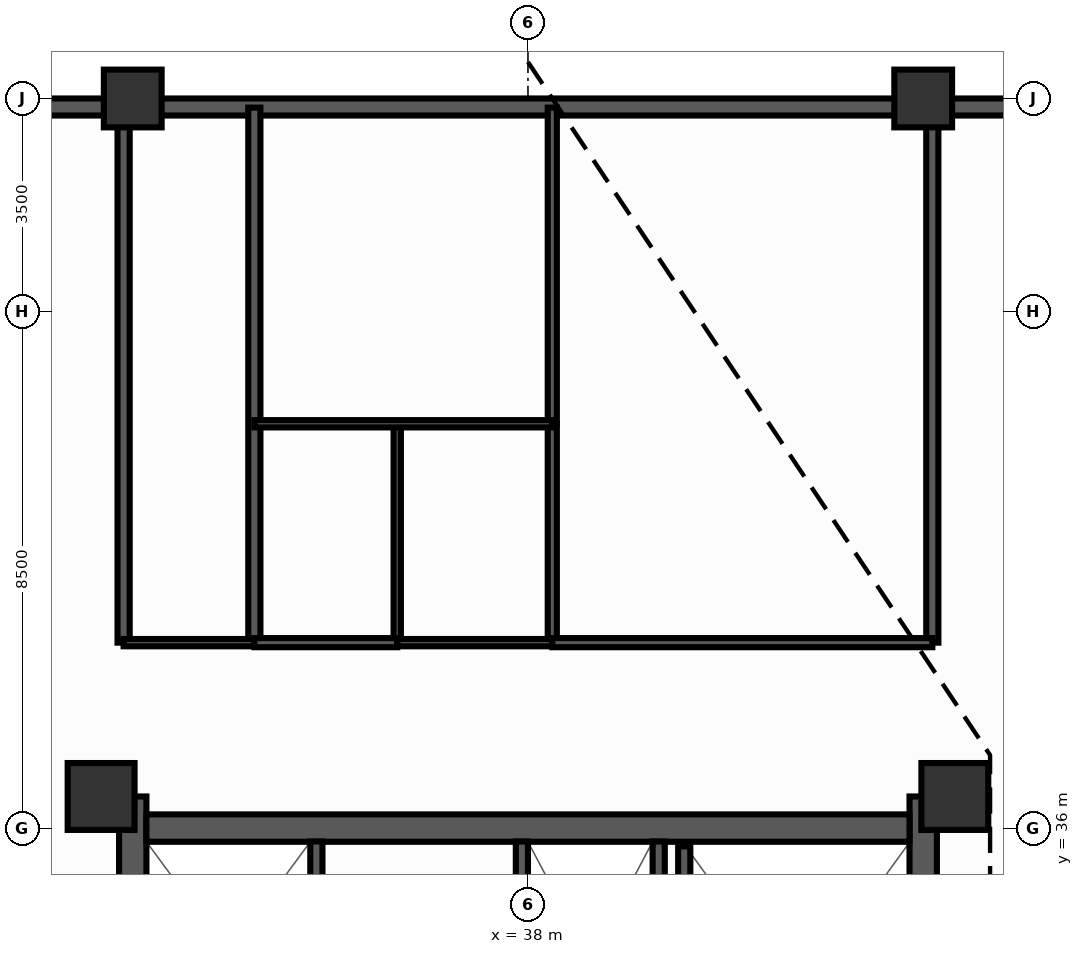
"""IFC4 building model, lengths in metres.
Left out: names, types, materials, properties, quantities, classifications, styles, units other than length and angle.
Written with IfcOpenShell. Run it as: python <this file> out.ifc"""

import sys

from ifc_helpers import new_model, si_unit, direction, frame, frame_2d, origin, origin_2d, place, context, subcontext, project, spatial, rectangle, extrude, source, transform, mapped, element, fill, save


model = new_model("IFC4")
c1 = context("Model", 3, precision=1e-05, world=origin(), true_north=direction((0.0, 1.0)))
c2 = subcontext(c1, "Body", "Model", "MODEL_VIEW")
j1 = project(units=[si_unit("LENGTHUNIT", "METRE"), si_unit("PLANEANGLEUNIT", "RADIAN")], contexts=[c1])
p1 = place(None, origin())
s1 = spatial("IfcSite", under=j1, at=p1, CompositionType="ELEMENT")
p2 = place(p1, origin())
s2 = spatial("IfcBuilding", under=s1, at=p2, CompositionType="ELEMENT")
p3 = place(p2, frame((0.0, 0.0, 148.7)))
s3 = spatial("IfcBuildingStorey", under=s2, at=p3, CompositionType="ELEMENT", Elevation=148.7)
p4 = place(p3, frame((31.5, 17.48, 0.0), z_axis=(0.0, 0.0, 1.0), x_axis=(0.0, 1.0, 0.0)))
e1 = element("IfcWall", 1, at=p4, inside=s3, PredefinedType="SHEAR", context=c2, shape_type="SweptSolid", body=[
    extrude(rectangle(XDim=19.04, YDim=0.45, at=frame_2d((9.52, 0.0))), origin(), (0.0, 0.0, 1.0), 3.5),
])
p5 = place(p4, frame((6.32, 0.0, 0.0)))
e2 = element("IfcOpeningElement", 2, at=p5, cuts=e1, PredefinedType="OPENING", context=c2, shape_type="SweptSolid", body=[
    extrude(rectangle(XDim=1.1, YDim=2.15, at=frame_2d((0.55, 1.075))), frame((0.0, 0.237, 0.0), z_axis=(0.0, -1.0, 0.0), x_axis=(1.0, 0.0, 0.0)), (0.0, 0.0, 1.0), 0.474),
])
p6 = place(p3, frame((44.5, 17.48, 0.0), z_axis=(0.0, 0.0, 1.0), x_axis=(0.0, 1.0, 0.0)))
e3 = element("IfcWall", 3, at=p6, inside=s3, PredefinedType="SHEAR", context=c2, shape_type="SweptSolid", body=[
    extrude(rectangle(XDim=19.04, YDim=0.45, at=frame_2d((9.52, 0.0))), origin(), (0.0, 0.0, 1.0), 3.5),
])
p7 = place(p6, frame((12.67, 0.0, 0.0), z_axis=(0.0, 0.0, 1.0), x_axis=(-1.0, 0.0, 0.0)))
e4 = element("IfcOpeningElement", 4, at=p7, cuts=e3, PredefinedType="OPENING", context=c2, shape_type="SweptSolid", body=[
    extrude(rectangle(XDim=1.1, YDim=2.15, at=frame_2d((0.55, 1.075))), frame((0.0, 0.237, 0.0), z_axis=(0.0, -1.0, 0.0), x_axis=(1.0, 0.0, 0.0)), (0.0, 0.0, 1.0), 0.474),
])
p8 = place(p3, frame((31.725, 36.0, 0.0), z_axis=(0.0, 0.0, 1.0), x_axis=(1.0, 0.0, 0.0)))
e5 = element("IfcWall", 5, at=p8, inside=s3, PredefinedType="SHEAR", context=c2, shape_type="SweptSolid", body=[
    extrude(rectangle(XDim=12.55, YDim=0.45, at=frame_2d((6.275, 0.0))), origin(), (0.0, 0.0, 1.0), 3.5),
])
p9 = place(p8, frame((5.225, 0.0, 0.0), z_axis=(0.0, 0.0, 1.0), x_axis=(-1.0, 0.0, 0.0)))
e6 = element("IfcOpeningElement", 6, at=p9, cuts=e5, PredefinedType="OPENING", context=c2, shape_type="SweptSolid", body=[
    extrude(rectangle(XDim=1.4, YDim=2.15, at=frame_2d((0.7, 1.075))), frame((0.0, 0.237, 0.0), z_axis=(0.0, -1.0, 0.0), x_axis=(1.0, 0.0, 0.0)), (0.0, 0.0, 1.0), 0.474),
])
m1 = source(origin(), c2, "Body", "SweptSolid", [
    extrude(rectangle(XDim=1.1, YDim=1.1, at=origin_2d()), origin(), (0.0, 0.0, 1.0), 3.5),
])
for number, where, z_axis, x_axis in (
    (7, (30.98, 36.52, 0.0), (0.0, 0.0, 1.0), (1.0, 0.0, 0.0)),
    (8, (45.02, 36.52, 0.0), (0.0, 0.0, 1.0), (1.0, 0.0, 0.0)),
):
    element("IfcColumn", number, at=place(p3, frame(where, z_axis=z_axis, x_axis=x_axis)), inside=s3, PredefinedType="COLUMN", context=c2, shape_type="MappedRepresentation", body=[
        mapped(m1, transform((0.0, 0.0, 0.0), scale=1.0)),
    ])
m2 = source(origin(), c2, "Body", "SweptSolid", [
    extrude(rectangle(XDim=0.95, YDim=0.95, at=origin_2d()), origin(), (0.0, 0.0, 1.0), 3.5),
])
for number, where, z_axis, x_axis in (
    (9, (44.5, 48.0, 0.0), (0.0, 0.0, 1.0), (1.0, 0.0, 0.0)),
    (10, (31.5, 48.0, 0.0), (0.0, 0.0, 1.0), (1.0, 0.0, 0.0)),
):
    element("IfcColumn", number, at=place(p3, frame(where, z_axis=z_axis, x_axis=x_axis)), inside=s3, PredefinedType="COLUMN", context=c2, shape_type="MappedRepresentation", body=[
        mapped(m2, transform((0.0, 0.0, 0.0), scale=1.0)),
    ])
p10 = place(p3, frame((21.0, 47.86, 0.0), z_axis=(0.0, 0.0, 1.0), x_axis=(1.0, 0.0, 0.0)))
e11 = element("IfcWall", 11, at=p10, inside=s3, PredefinedType="SOLIDWALL", context=c2, shape_type="SweptSolid", body=[
    extrude(rectangle(XDim=34.0, YDim=0.28, at=frame_2d((17.0, 0.0))), origin(), (0.0, 0.0, 1.0), 2.39),
])
p11 = place(p10, frame((4.65, 0.0, 0.25)))
e12 = element("IfcOpeningElement", 12, at=p11, cuts=e11, PredefinedType="OPENING", context=c2, shape_type="SweptSolid", body=[
    extrude(rectangle(XDim=1.2, YDim=1.5, at=frame_2d((0.6, 0.75))), frame((0.0, 0.152, 0.0), z_axis=(0.0, -1.0, 0.0), x_axis=(1.0, 0.0, 0.0)), (0.0, 0.0, 1.0), 0.304),
])
p12 = place(p10, frame((11.183, 0.0, 0.25)))
e13 = element("IfcOpeningElement", 13, at=p12, cuts=e11, PredefinedType="OPENING", context=c2, shape_type="SweptSolid", body=[
    extrude(rectangle(XDim=0.95, YDim=1.5, at=frame_2d((0.475, 0.75))), frame((0.0, 0.152, 0.0), z_axis=(0.0, -1.0, 0.0), x_axis=(1.0, 0.0, 0.0)), (0.0, 0.0, 1.0), 0.304),
])
p13 = place(p10, frame((14.35, 0.0, 0.25)))
e14 = element("IfcOpeningElement", 14, at=p13, cuts=e11, PredefinedType="OPENING", context=c2, shape_type="SweptSolid", body=[
    extrude(rectangle(XDim=1.2, YDim=1.5, at=frame_2d((0.6, 0.75))), frame((0.0, 0.152, 0.0), z_axis=(0.0, -1.0, 0.0), x_axis=(1.0, 0.0, 0.0)), (0.0, 0.0, 1.0), 0.304),
])
p14 = place(p10, frame((19.692, 0.0, 0.25)))
e15 = element("IfcOpeningElement", 15, at=p14, cuts=e11, PredefinedType="OPENING", context=c2, shape_type="SweptSolid", body=[
    extrude(rectangle(XDim=1.2, YDim=1.5, at=frame_2d((0.6, 0.75))), frame((0.0, 0.152, 0.0), z_axis=(0.0, -1.0, 0.0), x_axis=(1.0, 0.0, 0.0)), (0.0, 0.0, 1.0), 0.304),
])
p15 = place(p10, frame((28.15, 0.0, 0.25)))
e16 = element("IfcOpeningElement", 16, at=p15, cuts=e11, PredefinedType="OPENING", context=c2, shape_type="SweptSolid", body=[
    extrude(rectangle(XDim=1.2, YDim=1.5, at=frame_2d((0.6, 0.75))), frame((0.0, 0.152, 0.0), z_axis=(0.0, -1.0, 0.0), x_axis=(1.0, 0.0, 0.0)), (0.0, 0.0, 1.0), 0.304),
])
p16 = place(p3, frame((40.15, 31.8, 0.0), z_axis=(0.0, 0.0, 1.0), x_axis=(0.0, 1.0, 0.0)))
e17 = element("IfcWall", 17, at=p16, inside=s3, PredefinedType="PARTITIONING", context=c2, shape_type="SweptSolid", body=[
    extrude(rectangle(XDim=3.98, YDim=0.2, at=frame_2d((1.99, 0.0))), origin(), (0.0, 0.0, 1.0), 3.16),
])
p17 = place(p3, frame((40.57, 28.65, 0.0), z_axis=(0.0, 0.0, 1.0), x_axis=(0.0, 1.0, 0.0)))
e18 = element("IfcWall", 18, at=p17, inside=s3, PredefinedType="SOLIDWALL", context=c2, shape_type="SweptSolid", body=[
    extrude(rectangle(XDim=7.05, YDim=0.2, at=frame_2d((3.525, 0.0))), origin(), (0.0, 0.0, 1.0), 3.29),
])
p18 = place(p3, frame((34.52, 25.44, 0.0), z_axis=(0.0, 0.0, 1.0), x_axis=(0.0, 1.0, 0.0)))
e19 = element("IfcWall", 19, at=p18, inside=s3, PredefinedType="PARTITIONING", context=c2, shape_type="SweptSolid", body=[
    extrude(rectangle(XDim=10.34, YDim=0.2, at=frame_2d((5.17, 0.0))), origin(), (0.0, 0.0, 1.0), 3.16),
])
p19 = place(p18, frame((1.15, 0.0, 0.0)))
e20 = element("IfcOpeningElement", 20, at=p19, cuts=e19, PredefinedType="OPENING", context=c2, shape_type="SweptSolid", body=[
    extrude(rectangle(XDim=0.9, YDim=2.1, at=frame_2d((0.45, 1.05))), frame((0.0, 0.112, 0.0), z_axis=(0.0, -1.0, 0.0), x_axis=(1.0, 0.0, 0.0)), (0.0, 0.0, 1.0), 0.224),
])
p20 = place(p18, frame((4.35, 0.0, 0.0)))
e21 = element("IfcOpeningElement", 21, at=p20, cuts=e19, PredefinedType="OPENING", context=c2, shape_type="SweptSolid", body=[
    extrude(rectangle(XDim=0.9, YDim=2.1, at=frame_2d((0.45, 1.05))), frame((0.0, 0.112, 0.0), z_axis=(0.0, -1.0, 0.0), x_axis=(1.0, 0.0, 0.0)), (0.0, 0.0, 1.0), 0.224),
])
p21 = place(p18, frame((7.01, 0.0, 0.0)))
e22 = element("IfcOpeningElement", 22, at=p21, cuts=e19, PredefinedType="OPENING", context=c2, shape_type="SweptSolid", body=[
    extrude(rectangle(XDim=1.0, YDim=2.15, at=frame_2d((0.5, 1.075))), frame((0.0, 0.112, 0.0), z_axis=(0.0, -1.0, 0.0), x_axis=(1.0, 0.0, 0.0)), (0.0, 0.0, 1.0), 0.224),
])
p22 = place(p18, frame((8.76, 0.0, 0.0)))
e23 = element("IfcOpeningElement", 23, at=p22, cuts=e19, PredefinedType="OPENING", context=c2, shape_type="SweptSolid", body=[
    extrude(rectangle(XDim=1.0, YDim=2.15, at=frame_2d((0.5, 1.075))), frame((0.0, 0.112, 0.0), z_axis=(0.0, -1.0, 0.0), x_axis=(1.0, 0.0, 0.0)), (0.0, 0.0, 1.0), 0.224),
])
p23 = place(p3, frame((37.9, 25.44, 0.0), z_axis=(0.0, 0.0, 1.0), x_axis=(0.0, 1.0, 0.0)))
e24 = element("IfcWall", 24, at=p23, inside=s3, PredefinedType="PARTITIONING", context=c2, shape_type="SweptSolid", body=[
    extrude(rectangle(XDim=10.34, YDim=0.2, at=frame_2d((5.17, 0.0))), origin(), (0.0, 0.0, 1.0), 3.16),
])
p24 = place(p23, frame((0.32, 0.0, 0.0)))
e25 = element("IfcOpeningElement", 25, at=p24, cuts=e24, PredefinedType="OPENING", context=c2, shape_type="SweptSolid", body=[
    extrude(rectangle(XDim=1.0, YDim=2.15, at=frame_2d((0.5, 1.075))), frame((0.0, 0.112, 0.0), z_axis=(0.0, -1.0, 0.0), x_axis=(1.0, 0.0, 0.0)), (0.0, 0.0, 1.0), 0.224),
])
p25 = place(p23, frame((1.71, 0.0, 0.0)))
e26 = element("IfcOpeningElement", 26, at=p25, cuts=e24, PredefinedType="OPENING", context=c2, shape_type="SweptSolid", body=[
    extrude(rectangle(XDim=1.0, YDim=2.15, at=frame_2d((0.5, 1.075))), frame((0.0, 0.112, 0.0), z_axis=(0.0, -1.0, 0.0), x_axis=(1.0, 0.0, 0.0)), (0.0, 0.0, 1.0), 0.224),
])
p26 = place(p23, frame((3.51, 0.0, 0.0)))
e27 = element("IfcOpeningElement", 27, at=p26, cuts=e24, PredefinedType="OPENING", context=c2, shape_type="SweptSolid", body=[
    extrude(rectangle(XDim=1.0, YDim=2.15, at=frame_2d((0.5, 1.075))), frame((0.0, 0.112, 0.0), z_axis=(0.0, -1.0, 0.0), x_axis=(1.0, 0.0, 0.0)), (0.0, 0.0, 1.0), 0.224),
])
p27 = place(p23, frame((5.01, 0.0, 0.0)))
e28 = element("IfcOpeningElement", 28, at=p27, cuts=e24, PredefinedType="OPENING", context=c2, shape_type="SweptSolid", body=[
    extrude(rectangle(XDim=1.0, YDim=2.15, at=frame_2d((0.5, 1.075))), frame((0.0, 0.112, 0.0), z_axis=(0.0, -1.0, 0.0), x_axis=(1.0, 0.0, 0.0)), (0.0, 0.0, 1.0), 0.224),
])
p28 = place(p23, frame((6.86, 0.0, 0.0)))
e29 = element("IfcOpeningElement", 29, at=p28, cuts=e24, PredefinedType="OPENING", context=c2, shape_type="SweptSolid", body=[
    extrude(rectangle(XDim=1.0, YDim=2.15, at=frame_2d((0.5, 1.075))), frame((0.0, 0.112, 0.0), z_axis=(0.0, -1.0, 0.0), x_axis=(1.0, 0.0, 0.0)), (0.0, 0.0, 1.0), 0.224),
])
p29 = place(p23, frame((8.71, 0.0, 0.0)))
e30 = element("IfcOpeningElement", 30, at=p29, cuts=e24, PredefinedType="OPENING", context=c2, shape_type="SweptSolid", body=[
    extrude(rectangle(XDim=1.0, YDim=2.15, at=frame_2d((0.5, 1.075))), frame((0.0, 0.112, 0.0), z_axis=(0.0, -1.0, 0.0), x_axis=(1.0, 0.0, 0.0)), (0.0, 0.0, 1.0), 0.224),
])
for number, where, z_axis, x_axis in (
    (31, (31.35, 39.05, 0.0), (0.0, 0.0, 1.0), (0.0, 1.0, 0.0)),
    (32, (44.65, 39.05, 0.0), (0.0, 0.0, 1.0), (0.0, 1.0, 0.0)),
):
    element("IfcWall", number, at=place(p3, frame(where, z_axis=z_axis, x_axis=x_axis)), inside=s3, PredefinedType="PARTITIONING", context=c2, shape_type="SweptSolid", body=[
        extrude(rectangle(XDim=8.8, YDim=0.2, at=frame_2d((4.4, 0.0))), origin(), (0.0, 0.0, 1.0), 2.39),
    ])
p30 = place(p3, frame((33.5, 39.05, 0.0), z_axis=(0.0, 0.0, 1.0), x_axis=(0.0, 1.0, 0.0)))
e33 = element("IfcWall", 33, at=p30, inside=s3, PredefinedType="PARTITIONING", context=c2, shape_type="SweptSolid", body=[
    extrude(rectangle(XDim=8.8, YDim=0.2, at=frame_2d((4.4, 0.0))), origin(), (0.0, 0.0, 1.0), 3.16),
])
p31 = place(p3, frame((31.35, 39.05, 0.0), z_axis=(0.0, 0.0, 1.0), x_axis=(1.0, 0.0, 0.0)))
e34 = element("IfcWall", 34, at=p31, inside=s3, PredefinedType="PARTITIONING", context=c2, shape_type="SweptSolid", body=[
    extrude(rectangle(XDim=2.15, YDim=0.12, at=frame_2d((1.075, 0.0))), origin(), (0.0, 0.0, 1.0), 3.16),
])
p32 = place(p31, frame((0.575, 0.0, 0.0)))
e35 = element("IfcOpeningElement", 35, at=p32, cuts=e34, PredefinedType="OPENING", context=c2, shape_type="SweptSolid", body=[
    extrude(rectangle(XDim=1.0, YDim=2.1, at=frame_2d((0.5, 1.05))), frame((0.0, 0.072, 0.0), z_axis=(0.0, -1.0, 0.0), x_axis=(1.0, 0.0, 0.0)), (0.0, 0.0, 1.0), 0.144),
])
p33 = place(p3, frame((35.85, 39.05, 0.0), z_axis=(0.0, 0.0, 1.0), x_axis=(0.0, 1.0, 0.0)))
e36 = element("IfcWall", 36, at=p33, inside=s3, PredefinedType="PARTITIONING", context=c2, shape_type="SweptSolid", body=[
    extrude(rectangle(XDim=3.6, YDim=0.12, at=frame_2d((1.8, 0.0))), origin(), (0.0, 0.0, 1.0), 3.16),
])
p34 = place(p3, frame((38.4, 39.05, 0.0), z_axis=(0.0, 0.0, 1.0), x_axis=(0.0, 1.0, 0.0)))
e37 = element("IfcWall", 37, at=p34, inside=s3, PredefinedType="PARTITIONING", context=c2, shape_type="SweptSolid", body=[
    extrude(rectangle(XDim=3.6, YDim=0.15, at=frame_2d((1.8, 0.0))), origin(), (0.0, 0.0, 1.0), 3.16),
])
p35 = place(p3, frame((38.4, 42.65, 0.0), z_axis=(0.0, 0.0, 1.0), x_axis=(0.0, 1.0, 0.0)))
e38 = element("IfcWall", 38, at=p35, inside=s3, PredefinedType="PARTITIONING", context=c2, shape_type="SweptSolid", body=[
    extrude(rectangle(XDim=5.2, YDim=0.15, at=frame_2d((2.6, 0.0))), origin(), (0.0, 0.0, 1.0), 3.16),
])
p36 = place(p35, frame((2.15, 0.0, 0.0)))
e39 = element("IfcOpeningElement", 39, at=p36, cuts=e38, PredefinedType="OPENING", context=c2, shape_type="SweptSolid", body=[
    extrude(rectangle(XDim=0.9, YDim=2.1, at=frame_2d((0.45, 1.05))), frame((0.0, 0.087, 0.0), z_axis=(0.0, -1.0, 0.0), x_axis=(1.0, 0.0, 0.0)), (0.0, 0.0, 1.0), 0.174),
])
p37 = place(p3, frame((33.5, 42.65, 0.0), z_axis=(0.0, 0.0, 1.0), x_axis=(1.0, 0.0, 0.0)))
e40 = element("IfcWall", 40, at=p37, inside=s3, PredefinedType="PARTITIONING", context=c2, shape_type="SweptSolid", body=[
    extrude(rectangle(XDim=4.9, YDim=0.12, at=frame_2d((2.45, 0.0))), origin(), (0.0, 0.0, 1.0), 2.89),
])
p38 = place(p3, frame((33.5, 39.05, 0.0), z_axis=(0.0, 0.0, 1.0), x_axis=(1.0, 0.0, 0.0)))
e41 = element("IfcWall", 41, at=p38, inside=s3, PredefinedType="PARTITIONING", context=c2, shape_type="SweptSolid", body=[
    extrude(rectangle(XDim=2.35, YDim=0.15, at=frame_2d((1.175, 0.0))), origin(), (0.0, 0.0, 1.0), 3.16),
])
p39 = place(p38, frame((0.725, 0.0, 0.0)))
e42 = element("IfcOpeningElement", 42, at=p39, cuts=e41, PredefinedType="OPENING", context=c2, shape_type="SweptSolid", body=[
    extrude(rectangle(XDim=0.9, YDim=2.1, at=frame_2d((0.45, 1.05))), frame((0.0, 0.087, 0.0), z_axis=(0.0, -1.0, 0.0), x_axis=(1.0, 0.0, 0.0)), (0.0, 0.0, 1.0), 0.174),
])
p40 = place(p3, frame((35.85, 39.05, 0.0), z_axis=(0.0, 0.0, 1.0), x_axis=(1.0, 0.0, 0.0)))
e43 = element("IfcWall", 43, at=p40, inside=s3, PredefinedType="PARTITIONING", context=c2, shape_type="SweptSolid", body=[
    extrude(rectangle(XDim=2.55, YDim=0.12, at=frame_2d((1.275, 0.0))), origin(), (0.0, 0.0, 1.0), 3.16),
])
p41 = place(p40, frame((0.775, 0.0, 0.0)))
e44 = element("IfcOpeningElement", 44, at=p41, cuts=e43, PredefinedType="OPENING", context=c2, shape_type="SweptSolid", body=[
    extrude(rectangle(XDim=1.0, YDim=2.1, at=frame_2d((0.5, 1.05))), frame((0.0, 0.072, 0.0), z_axis=(0.0, -1.0, 0.0), x_axis=(1.0, 0.0, 0.0)), (0.0, 0.0, 1.0), 0.144),
])
p42 = place(p3, frame((38.4, 39.05, 0.0), z_axis=(0.0, 0.0, 1.0), x_axis=(1.0, 0.0, 0.0)))
e45 = element("IfcWall", 45, at=p42, inside=s3, PredefinedType="PARTITIONING", context=c2, shape_type="SweptSolid", body=[
    extrude(rectangle(XDim=6.25, YDim=0.15, at=frame_2d((3.125, 0.0))), origin(), (0.0, 0.0, 1.0), 3.16),
])
p43 = place(p42, frame((2.382, 0.0, 0.0)))
e46 = element("IfcOpeningElement", 46, at=p43, cuts=e45, PredefinedType="OPENING", context=c2, shape_type="SweptSolid", body=[
    extrude(rectangle(XDim=1.1, YDim=2.15, at=frame_2d((0.55, 1.075))), frame((0.0, 0.087, 0.0), z_axis=(0.0, -1.0, 0.0), x_axis=(1.0, 0.0, 0.0)), (0.0, 0.0, 1.0), 0.174),
])
m3 = source(origin(), c2, "Body", "SweptSolid", [
    extrude(rectangle(XDim=0.95, YDim=1.5, at=frame_2d((0.475, 0.75))), frame((0.0, 0.03, 0.0), z_axis=(0.0, -1.0, 0.0), x_axis=(1.0, 0.0, 0.0)), (0.0, 0.0, 1.0), 0.06),
])
p44 = place(p12, origin())
e47 = element("IfcWindow", 47, at=p44, inside=s3, PartitioningType="SINGLE_PANEL", PredefinedType="WINDOW", context=c2, shape_type="MappedRepresentation", body=[
    mapped(m3, transform((0.0, 0.0, 0.0), scale=1.0)),
])
fill(e13, e47)
m4 = source(origin(), c2, "Body", "SweptSolid", [
    extrude(rectangle(XDim=1.2, YDim=1.5, at=frame_2d((0.6, 0.75))), frame((0.0, 0.03, 0.0), z_axis=(0.0, -1.0, 0.0), x_axis=(1.0, 0.0, 0.0)), (0.0, 0.0, 1.0), 0.06),
])
p45 = place(p13, origin())
e48 = element("IfcWindow", 48, at=p45, inside=s3, PartitioningType="SINGLE_PANEL", PredefinedType="WINDOW", context=c2, shape_type="MappedRepresentation", body=[
    mapped(m4, transform((0.0, 0.0, 0.0), scale=1.0)),
])
fill(e14, e48)
p46 = place(p14, origin())
e49 = element("IfcWindow", 49, at=p46, inside=s3, PartitioningType="SINGLE_PANEL", PredefinedType="WINDOW", context=c2, shape_type="MappedRepresentation", body=[
    mapped(m4, transform((0.0, 0.0, 0.0), scale=1.0)),
])
fill(e15, e49)
m5 = source(origin(), c2, "Body", "SweptSolid", [
    extrude(rectangle(XDim=1.4, YDim=2.15, at=frame_2d((0.7, 1.075))), frame((0.0, 0.025, 0.0), z_axis=(0.0, -1.0, 0.0), x_axis=(1.0, 0.0, 0.0)), (0.0, 0.0, 1.0), 0.05),
])
p47 = place(p9, origin())
e50 = element("IfcDoor", 50, at=p47, inside=s3, OperationType="SINGLE_SWING_RIGHT", PredefinedType="DOOR", context=c2, shape_type="MappedRepresentation", body=[
    mapped(m5, transform((0.0, 0.0, 0.0), scale=1.0)),
])
fill(e6, e50)
m6 = source(origin(), c2, "Body", "SweptSolid", [
    extrude(rectangle(XDim=1.0, YDim=2.1, at=frame_2d((0.5, 1.05))), frame((0.0, 0.025, 0.0), z_axis=(0.0, -1.0, 0.0), x_axis=(1.0, 0.0, 0.0)), (0.0, 0.0, 1.0), 0.05),
])
p48 = place(p32, origin())
e51 = element("IfcDoor", 51, at=p48, inside=s3, OperationType="SINGLE_SWING_RIGHT", PredefinedType="DOOR", context=c2, shape_type="MappedRepresentation", body=[
    mapped(m6, transform((0.0, 0.0, 0.0), scale=1.0)),
])
fill(e35, e51)
m7 = source(origin(), c2, "Body", "SweptSolid", [
    extrude(rectangle(XDim=0.9, YDim=2.1, at=frame_2d((0.45, 1.05))), frame((0.0, 0.025, 0.0), z_axis=(0.0, -1.0, 0.0), x_axis=(1.0, 0.0, 0.0)), (0.0, 0.0, 1.0), 0.05),
])
p49 = place(p36, origin())
e52 = element("IfcDoor", 52, at=p49, inside=s3, OperationType="SINGLE_SWING_LEFT", PredefinedType="DOOR", context=c2, shape_type="MappedRepresentation", body=[
    mapped(m7, transform((0.0, 0.0, 0.0), scale=1.0)),
])
fill(e39, e52)
p50 = place(p39, origin())
e53 = element("IfcDoor", 53, at=p50, inside=s3, OperationType="SINGLE_SWING_RIGHT", PredefinedType="DOOR", context=c2, shape_type="MappedRepresentation", body=[
    mapped(m7, transform((0.0, 0.0, 0.0), scale=1.0)),
])
fill(e42, e53)
p51 = place(p41, origin())
e54 = element("IfcDoor", 54, at=p51, inside=s3, OperationType="SINGLE_SWING_LEFT", PredefinedType="DOOR", context=c2, shape_type="MappedRepresentation", body=[
    mapped(m6, transform((0.0, 0.0, 0.0), scale=1.0)),
])
fill(e44, e54)
m8 = source(origin(), c2, "Body", "SweptSolid", [
    extrude(rectangle(XDim=1.1, YDim=2.15, at=frame_2d((0.55, 1.075))), frame((0.0, 0.025, 0.0), z_axis=(0.0, -1.0, 0.0), x_axis=(1.0, 0.0, 0.0)), (0.0, 0.0, 1.0), 0.05),
])
p52 = place(p43, origin())
e55 = element("IfcDoor", 55, at=p52, inside=s3, OperationType="SINGLE_SWING_RIGHT", PredefinedType="DOOR", context=c2, shape_type="MappedRepresentation", body=[
    mapped(m8, transform((0.0, 0.0, 0.0), scale=1.0)),
])
fill(e46, e55)
save(model, sys.argv[1])
